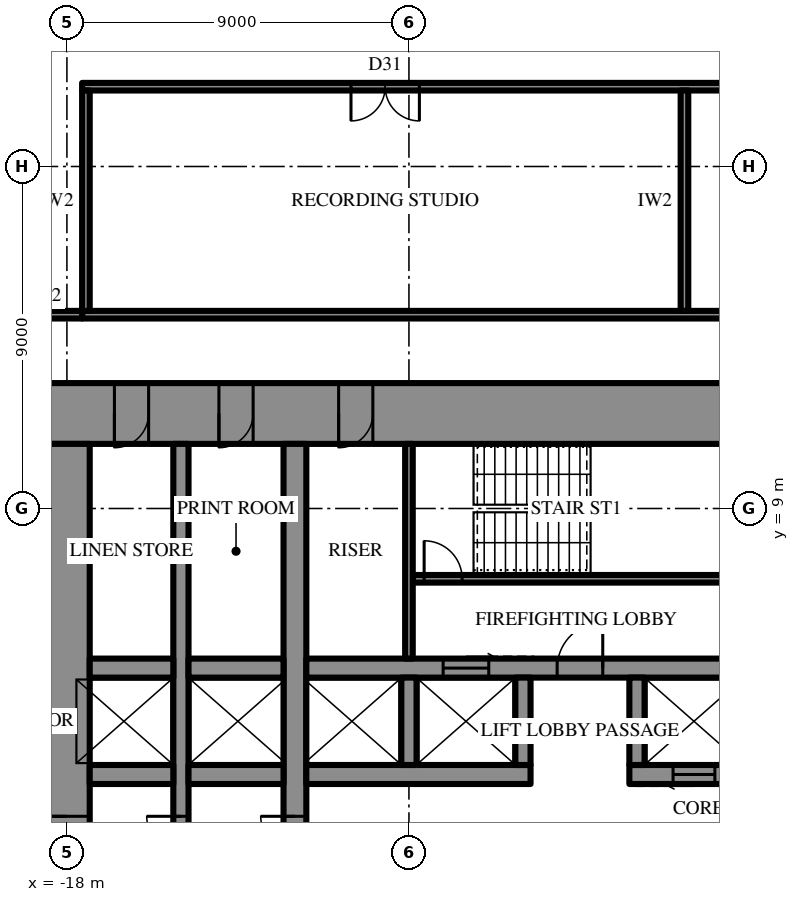
"""IFC4 building model, lengths in metres.
Left out: names, types, materials, properties, quantities, classifications, styles, units other than length and angle.
Written with IfcOpenShell. Run it as: python <this file> out.ifc"""

import sys

from ifc_helpers import new_model, si_unit, direction, frame, frame_2d, origin, place, context, subcontext, project, spatial, rectangle, extrude, element, fill, save


model = new_model("IFC4")
c1 = context("Model", 3, precision=1e-05, world=origin(), true_north=direction((0.0, 1.0)))
c2 = subcontext(c1, "Body", "Model", "MODEL_VIEW")
j1 = project(units=[si_unit("LENGTHUNIT", "METRE"), si_unit("PLANEANGLEUNIT", "RADIAN")], contexts=[c1])
p1 = place(None, origin())
s1 = spatial("IfcSite", under=j1, at=p1, CompositionType="ELEMENT")
p2 = place(p1, origin())
s2 = spatial("IfcBuilding", under=s1, at=p2, CompositionType="ELEMENT")
p3 = place(p2, frame((0.0, 0.0, 99.1)))
s3 = spatial("IfcBuildingStorey", under=s2, at=p3, CompositionType="ELEMENT", Elevation=99.1)
p4 = place(p3, frame((-18.6, 11.5, 0.0), z_axis=(0.0, 0.0, 1.0), x_axis=(1.0, 0.0, 0.0)))
e1 = element("IfcWall", 1, at=p4, inside=s3, PredefinedType="SHEAR", context=c2, shape_type="SweptSolid", body=[
    extrude(rectangle(XDim=37.2, YDim=1.6, at=frame_2d((18.6, 0.0))), origin(), (0.0, 0.0, 1.0), 4.2),
])
p5 = place(p4, frame((19.45, 0.0, 0.0)))
e2 = element("IfcOpeningElement", 2, at=p5, cuts=e1, PredefinedType="OPENING", context=c2, shape_type="SweptSolid", body=[
    extrude(rectangle(XDim=0.9, YDim=2.2, at=frame_2d((0.45, 1.1))), frame((0.0, 0.81, 0.0), z_axis=(0.0, -1.0, 0.0), x_axis=(1.0, 0.0, 0.0)), (0.0, 0.0, 1.0), 1.62),
])
p6 = place(p4, frame((22.45, 0.0, 0.0)))
e3 = element("IfcOpeningElement", 3, at=p6, cuts=e1, PredefinedType="OPENING", context=c2, shape_type="SweptSolid", body=[
    extrude(rectangle(XDim=0.9, YDim=2.2, at=frame_2d((0.45, 1.1))), frame((0.0, 0.81, 0.0), z_axis=(0.0, -1.0, 0.0), x_axis=(1.0, 0.0, 0.0)), (0.0, 0.0, 1.0), 1.62),
])
p7 = place(p4, frame((25.5, 0.0, 0.0)))
e4 = element("IfcOpeningElement", 4, at=p7, cuts=e1, PredefinedType="OPENING", context=c2, shape_type="SweptSolid", body=[
    extrude(rectangle(XDim=1.0, YDim=2.2, at=frame_2d((0.5, 1.1))), frame((0.0, 0.81, 0.0), z_axis=(0.0, -1.0, 0.0), x_axis=(1.0, 0.0, 0.0)), (0.0, 0.0, 1.0), 1.62),
])
p8 = place(p4, frame((1.85, 0.0, 0.0)))
e5 = element("IfcOpeningElement", 5, at=p8, cuts=e1, PredefinedType="OPENING", context=c2, shape_type="SweptSolid", body=[
    extrude(rectangle(XDim=0.9, YDim=2.2, at=frame_2d((0.45, 1.1))), frame((0.0, 0.81, 0.0), z_axis=(0.0, -1.0, 0.0), x_axis=(1.0, 0.0, 0.0)), (0.0, 0.0, 1.0), 1.62),
])
p9 = place(p4, frame((4.6, 0.0, 0.0)))
e6 = element("IfcOpeningElement", 6, at=p9, cuts=e1, PredefinedType="OPENING", context=c2, shape_type="SweptSolid", body=[
    extrude(rectangle(XDim=0.9, YDim=2.2, at=frame_2d((0.45, 1.1))), frame((0.0, 0.81, 0.0), z_axis=(0.0, -1.0, 0.0), x_axis=(1.0, 0.0, 0.0)), (0.0, 0.0, 1.0), 1.62),
])
p10 = place(p4, frame((7.75, 0.0, 0.0)))
e7 = element("IfcOpeningElement", 7, at=p10, cuts=e1, PredefinedType="OPENING", context=c2, shape_type="SweptSolid", body=[
    extrude(rectangle(XDim=0.9, YDim=2.2, at=frame_2d((0.45, 1.1))), frame((0.0, 0.81, 0.0), z_axis=(0.0, -1.0, 0.0), x_axis=(1.0, 0.0, 0.0)), (0.0, 0.0, 1.0), 1.62),
])
p11 = place(p4, frame((28.55, 0.0, 0.0)))
e8 = element("IfcOpeningElement", 8, at=p11, cuts=e1, PredefinedType="OPENING", context=c2, shape_type="SweptSolid", body=[
    extrude(rectangle(XDim=0.9, YDim=2.2, at=frame_2d((0.45, 1.1))), frame((0.0, 0.81, 0.0), z_axis=(0.0, -1.0, 0.0), x_axis=(1.0, 0.0, 0.0)), (0.0, 0.0, 1.0), 1.62),
])
p12 = place(p4, frame((31.7, 0.0, 0.0)))
e9 = element("IfcOpeningElement", 9, at=p12, cuts=e1, PredefinedType="OPENING", context=c2, shape_type="SweptSolid", body=[
    extrude(rectangle(XDim=0.9, YDim=2.2, at=frame_2d((0.45, 1.1))), frame((0.0, 0.81, 0.0), z_axis=(0.0, -1.0, 0.0), x_axis=(1.0, 0.0, 0.0)), (0.0, 0.0, 1.0), 1.62),
])
p13 = place(p4, frame((34.45, 0.0, 0.0)))
e10 = element("IfcOpeningElement", 10, at=p13, cuts=e1, PredefinedType="OPENING", context=c2, shape_type="SweptSolid", body=[
    extrude(rectangle(XDim=0.9, YDim=2.2, at=frame_2d((0.45, 1.1))), frame((0.0, 0.81, 0.0), z_axis=(0.0, -1.0, 0.0), x_axis=(1.0, 0.0, 0.0)), (0.0, 0.0, 1.0), 1.62),
])
p14 = place(p3, frame((-18.0, 10.7, 0.0), z_axis=(0.0, 0.0, 1.0), x_axis=(0.0, -1.0, 0.0)))
e11 = element("IfcWall", 11, at=p14, inside=s3, PredefinedType="SHEAR", context=c2, shape_type="SweptSolid", body=[
    extrude(rectangle(XDim=21.4, YDim=1.2, at=frame_2d((10.7, 0.0))), origin(), (0.0, 0.0, 1.0), 4.2),
])
p15 = place(p14, frame((9.8, 0.0, 0.0)))
e12 = element("IfcOpeningElement", 12, at=p15, cuts=e11, PredefinedType="OPENING", context=c2, shape_type="SweptSolid", body=[
    extrude(rectangle(XDim=1.8, YDim=2.4, at=frame_2d((0.9, 1.2))), frame((0.0, 0.61, 0.0), z_axis=(0.0, -1.0, 0.0), x_axis=(1.0, 0.0, 0.0)), (0.0, 0.0, 1.0), 1.22),
])
p16 = place(p3, frame((-12.0, -10.7, 0.0), z_axis=(0.0, 0.0, 1.0), x_axis=(0.0, 1.0, 0.0)))
e13 = element("IfcWall", 13, at=p16, inside=s3, PredefinedType="SHEAR", context=c2, shape_type="SweptSolid", body=[
    extrude(rectangle(XDim=21.4, YDim=0.6, at=frame_2d((10.7, 0.0))), origin(), (0.0, 0.0, 1.0), 4.2),
])
p17 = place(p16, frame((9.8, 0.0, 0.0)))
e14 = element("IfcOpeningElement", 14, at=p17, cuts=e13, PredefinedType="OPENING", context=c2, shape_type="SweptSolid", body=[
    extrude(rectangle(XDim=1.8, YDim=2.4, at=frame_2d((0.9, 1.2))), frame((0.0, 0.31, 0.0), z_axis=(0.0, -1.0, 0.0), x_axis=(1.0, 0.0, 0.0)), (0.0, 0.0, 1.0), 0.62),
])
p18 = place(p3, frame((-15.0, -10.7, 0.0), z_axis=(0.0, 0.0, 1.0), x_axis=(0.0, 1.0, 0.0)))
e15 = element("IfcWall", 15, at=p18, inside=s3, PredefinedType="SHEAR", context=c2, shape_type="SweptSolid", body=[
    extrude(rectangle(XDim=21.4, YDim=0.4, at=frame_2d((10.7, 0.0))), origin(), (0.0, 0.0, 1.0), 4.2),
])
p19 = place(p18, frame((9.8, 0.0, 0.0)))
e16 = element("IfcOpeningElement", 16, at=p19, cuts=e15, PredefinedType="OPENING", context=c2, shape_type="SweptSolid", body=[
    extrude(rectangle(XDim=1.8, YDim=2.4, at=frame_2d((0.9, 1.2))), frame((0.0, 0.21, 0.0), z_axis=(0.0, -1.0, 0.0), x_axis=(1.0, 0.0, 0.0)), (0.0, 0.0, 1.0), 0.42),
])
p20 = place(p3, frame((-17.4, 2.0, 0.0), z_axis=(0.0, 0.0, 1.0), x_axis=(1.0, 0.0, 0.0)))
e17 = element("IfcWall", 17, at=p20, inside=s3, PredefinedType="SHEAR", context=c2, shape_type="SweptSolid", body=[
    extrude(rectangle(XDim=2.2, YDim=0.5, at=frame_2d((1.1, 0.0))), origin(), (0.0, 0.0, 1.0), 4.2),
])
p21 = place(p3, frame((-14.8, 2.0, 0.0), z_axis=(0.0, 0.0, 1.0), x_axis=(1.0, 0.0, 0.0)))
e18 = element("IfcWall", 18, at=p21, inside=s3, PredefinedType="SHEAR", context=c2, shape_type="SweptSolid", body=[
    extrude(rectangle(XDim=2.5, YDim=0.5, at=frame_2d((1.25, 0.0))), origin(), (0.0, 0.0, 1.0), 4.2),
])
p22 = place(p3, frame((-11.7, 2.0, 0.0), z_axis=(0.0, 0.0, 1.0), x_axis=(1.0, 0.0, 0.0)))
e19 = element("IfcWall", 19, at=p22, inside=s3, PredefinedType="SHEAR", context=c2, shape_type="SweptSolid", body=[
    extrude(rectangle(XDim=5.9, YDim=0.5, at=frame_2d((2.95, 0.0))), origin(), (0.0, 0.0, 1.0), 4.2),
])
p23 = place(p3, frame((-3.2, 2.0, 0.0), z_axis=(0.0, 0.0, 1.0), x_axis=(1.0, 0.0, 0.0)))
e20 = element("IfcWall", 20, at=p23, inside=s3, PredefinedType="SHEAR", context=c2, shape_type="SweptSolid", body=[
    extrude(rectangle(XDim=14.9, YDim=0.5, at=frame_2d((7.45, 0.0))), origin(), (0.0, 0.0, 1.0), 4.2),
])
p24 = place(p23, frame((1.15, 0.0, 0.0)))
e21 = element("IfcOpeningElement", 21, at=p24, cuts=e20, PredefinedType="OPENING", context=c2, shape_type="SweptSolid", body=[
    extrude(rectangle(XDim=1.1, YDim=2.2, at=frame_2d((0.55, 1.1))), frame((0.0, 0.26, 0.0), z_axis=(0.0, -1.0, 0.0), x_axis=(1.0, 0.0, 0.0)), (0.0, 0.0, 1.0), 0.52),
])
p25 = place(p23, frame((4.15, 0.0, 0.0)))
e22 = element("IfcOpeningElement", 22, at=p25, cuts=e20, PredefinedType="OPENING", context=c2, shape_type="SweptSolid", body=[
    extrude(rectangle(XDim=1.1, YDim=2.2, at=frame_2d((0.55, 1.1))), frame((0.0, 0.26, 0.0), z_axis=(0.0, -1.0, 0.0), x_axis=(1.0, 0.0, 0.0)), (0.0, 0.0, 1.0), 0.52),
])
p26 = place(p23, frame((7.15, 0.0, 0.0)))
e23 = element("IfcOpeningElement", 23, at=p26, cuts=e20, PredefinedType="OPENING", context=c2, shape_type="SweptSolid", body=[
    extrude(rectangle(XDim=1.1, YDim=2.2, at=frame_2d((0.55, 1.1))), frame((0.0, 0.26, 0.0), z_axis=(0.0, -1.0, 0.0), x_axis=(1.0, 0.0, 0.0)), (0.0, 0.0, 1.0), 0.52),
])
p27 = place(p23, frame((10.15, 0.0, 0.0)))
e24 = element("IfcOpeningElement", 24, at=p27, cuts=e20, PredefinedType="OPENING", context=c2, shape_type="SweptSolid", body=[
    extrude(rectangle(XDim=1.1, YDim=2.2, at=frame_2d((0.55, 1.1))), frame((0.0, 0.26, 0.0), z_axis=(0.0, -1.0, 0.0), x_axis=(1.0, 0.0, 0.0)), (0.0, 0.0, 1.0), 0.52),
])
p28 = place(p3, frame((-17.4, 4.8, 0.0), z_axis=(0.0, 0.0, 1.0), x_axis=(1.0, 0.0, 0.0)))
e25 = element("IfcWall", 25, at=p28, inside=s3, PredefinedType="SHEAR", context=c2, shape_type="SweptSolid", body=[
    extrude(rectangle(XDim=2.2, YDim=0.5, at=frame_2d((1.1, 0.0))), origin(), (0.0, 0.0, 1.0), 4.2),
])
p29 = place(p3, frame((-14.8, 4.8, 0.0), z_axis=(0.0, 0.0, 1.0), x_axis=(1.0, 0.0, 0.0)))
e26 = element("IfcWall", 26, at=p29, inside=s3, PredefinedType="SHEAR", context=c2, shape_type="SweptSolid", body=[
    extrude(rectangle(XDim=2.5, YDim=0.5, at=frame_2d((1.25, 0.0))), origin(), (0.0, 0.0, 1.0), 4.2),
])
p30 = place(p3, frame((-11.7, 4.8, 0.0), z_axis=(0.0, 0.0, 1.0), x_axis=(1.0, 0.0, 0.0)))
e27 = element("IfcWall", 27, at=p30, inside=s3, PredefinedType="SHEAR", context=c2, shape_type="SweptSolid", body=[
    extrude(rectangle(XDim=23.4, YDim=0.5, at=frame_2d((11.7, 0.0))), origin(), (0.0, 0.0, 1.0), 4.2),
])
p31 = place(p30, frame((6.6, 0.0, 0.0)))
e28 = element("IfcOpeningElement", 28, at=p31, cuts=e27, PredefinedType="OPENING", context=c2, shape_type="SweptSolid", body=[
    extrude(rectangle(XDim=1.2, YDim=2.2, at=frame_2d((0.6, 1.1))), frame((0.0, 0.26, 0.0), z_axis=(0.0, -1.0, 0.0), x_axis=(1.0, 0.0, 0.0)), (0.0, 0.0, 1.0), 0.52),
])
p32 = place(p30, frame((3.6, 0.0, 0.0)))
e29 = element("IfcOpeningElement", 29, at=p32, cuts=e27, PredefinedType="OPENING", context=c2, shape_type="SweptSolid", body=[
    extrude(rectangle(XDim=1.2, YDim=2.2, at=frame_2d((0.6, 1.1))), frame((0.0, 0.26, 0.0), z_axis=(0.0, -1.0, 0.0), x_axis=(1.0, 0.0, 0.0)), (0.0, 0.0, 1.0), 0.52),
])
for number, where, z_axis, x_axis in (
    (30, (-9.0, 2.25, 0.0), (0.0, 0.0, 1.0), (0.0, 1.0, 0.0)),
    (31, (-6.0, 2.25, 0.0), (0.0, 0.0, 1.0), (0.0, 1.0, 0.0)),
    (32, (-3.0, 2.25, 0.0), (0.0, 0.0, 1.0), (0.0, 1.0, 0.0)),
):
    element("IfcWall", number, at=place(p3, frame(where, z_axis=z_axis, x_axis=x_axis)), inside=s3, PredefinedType="SHEAR", context=c2, shape_type="SweptSolid", body=[
        extrude(rectangle(XDim=2.3, YDim=0.4, at=frame_2d((1.15, 0.0))), origin(), (0.0, 0.0, 1.0), 4.2),
    ])
p33 = place(p3, frame((-8.9, 7.15, 0.0), z_axis=(0.0, 0.0, 1.0), x_axis=(1.0, 0.0, 0.0)))
e33 = element("IfcWall", 33, at=p33, inside=s3, PredefinedType="SHEAR", context=c2, shape_type="SweptSolid", body=[
    extrude(rectangle(XDim=8.6, YDim=0.2, at=frame_2d((4.3, 0.0))), origin(), (0.0, 0.0, 1.0), 4.2),
])
p34 = place(p33, frame((0.3, 0.0, 0.0)))
e34 = element("IfcOpeningElement", 34, at=p34, cuts=e33, PredefinedType="OPENING", context=c2, shape_type="SweptSolid", body=[
    extrude(rectangle(XDim=1.0, YDim=2.2, at=frame_2d((0.5, 1.1))), frame((0.0, 0.11, 0.0), z_axis=(0.0, -1.0, 0.0), x_axis=(1.0, 0.0, 0.0)), (0.0, 0.0, 1.0), 0.22),
])
p35 = place(p3, frame((-9.0, 5.05, 0.0), z_axis=(0.0, 0.0, 1.0), x_axis=(0.0, 1.0, 0.0)))
e35 = element("IfcWall", 35, at=p35, inside=s3, PredefinedType="PARTITIONING", context=c2, shape_type="SweptSolid", body=[
    extrude(rectangle(XDim=5.65, YDim=0.2, at=frame_2d((2.825, 0.0))), origin(), (0.0, 0.0, 1.0), 4.0),
])
p36 = place(p3, frame((-17.6, 14.1, 0.0), z_axis=(0.0, 0.0, 1.0), x_axis=(1.0, 0.0, 0.0)))
e36 = element("IfcWall", 36, at=p36, inside=s3, PredefinedType="PARTITIONING", context=c2, shape_type="SweptSolid", body=[
    extrude(rectangle(XDim=35.2, YDim=0.2, at=frame_2d((17.6, 0.0))), origin(), (0.0, 0.0, 1.0), 4.0),
])
p37 = place(p3, frame((-17.6, 20.1, 0.0), z_axis=(0.0, 0.0, 1.0), x_axis=(1.0, 0.0, 0.0)))
e37 = element("IfcWall", 37, at=p37, inside=s3, PredefinedType="PARTITIONING", context=c2, shape_type="SweptSolid", body=[
    extrude(rectangle(XDim=35.2, YDim=0.2, at=frame_2d((17.6, 0.0))), origin(), (0.0, 0.0, 1.0), 4.0),
])
p38 = place(p37, frame((7.075, 0.0, 0.0)))
e38 = element("IfcOpeningElement", 38, at=p38, cuts=e37, PredefinedType="OPENING", context=c2, shape_type="SweptSolid", body=[
    extrude(rectangle(XDim=1.8, YDim=2.4, at=frame_2d((0.9, 1.2))), frame((0.0, 0.11, 0.0), z_axis=(0.0, -1.0, 0.0), x_axis=(1.0, 0.0, 0.0)), (0.0, 0.0, 1.0), 0.22),
])
p39 = place(p37, frame((19.762, 0.0, 0.0)))
e39 = element("IfcOpeningElement", 39, at=p39, cuts=e37, PredefinedType="OPENING", context=c2, shape_type="SweptSolid", body=[
    extrude(rectangle(XDim=1.8, YDim=2.4, at=frame_2d((0.9, 1.2))), frame((0.0, 0.11, 0.0), z_axis=(0.0, -1.0, 0.0), x_axis=(1.0, 0.0, 0.0)), (0.0, 0.0, 1.0), 0.22),
])
p40 = place(p37, frame((29.387, 0.0, 0.0)))
e40 = element("IfcOpeningElement", 40, at=p40, cuts=e37, PredefinedType="OPENING", context=c2, shape_type="SweptSolid", body=[
    extrude(rectangle(XDim=1.8, YDim=2.4, at=frame_2d((0.9, 1.2))), frame((0.0, 0.11, 0.0), z_axis=(0.0, -1.0, 0.0), x_axis=(1.0, 0.0, 0.0)), (0.0, 0.0, 1.0), 0.22),
])
for number, where, z_axis, x_axis in (
    (41, (-17.5, 14.2, 0.0), (0.0, 0.0, 1.0), (0.0, 1.0, 0.0)),
    (42, (-1.75, 14.2, 0.0), (0.0, 0.0, 1.0), (0.0, 1.0, 0.0)),
):
    element("IfcWall", number, at=place(p3, frame(where, z_axis=z_axis, x_axis=x_axis)), inside=s3, PredefinedType="PARTITIONING", context=c2, shape_type="SweptSolid", body=[
        extrude(rectangle(XDim=5.8, YDim=0.2, at=frame_2d((2.9, 0.0))), origin(), (0.0, 0.0, 1.0), 4.0),
    ])
p41 = place(p3, frame((-19.6, 14.1, 0.0), z_axis=(0.0, 0.0, 1.0), x_axis=(1.0, 0.0, 0.0)))
e43 = element("IfcWall", 43, at=p41, inside=s3, PredefinedType="PARTITIONING", context=c2, shape_type="SweptSolid", body=[
    extrude(rectangle(XDim=2.0, YDim=0.2, at=frame_2d((1.0, 0.0))), origin(), (0.0, 0.0, 1.0), 4.0),
])
p42 = place(p15, frame((1.8, 0.0, 0.0), z_axis=(0.0, 0.0, 1.0), x_axis=(-1.0, 0.0, 0.0)))
e44 = element("IfcDoor", 44, at=p42, inside=s3, OperationType="DOUBLE_DOOR_SINGLE_SWING", PredefinedType="DOOR", context=c2, shape_type="SweptSolid", body=[
    extrude(rectangle(XDim=1.8, YDim=2.4, at=frame_2d((0.9, 1.2))), frame((0.0, 0.025, 0.0), z_axis=(0.0, -1.0, 0.0), x_axis=(1.0, 0.0, 0.0)), (0.0, 0.0, 1.0), 0.05),
])
fill(e12, e44)
p43 = place(p31, origin())
e45 = element("IfcDoor", 45, at=p43, inside=s3, OperationType="SINGLE_SWING_LEFT", PredefinedType="DOOR", context=c2, shape_type="SweptSolid", body=[
    extrude(rectangle(XDim=1.2, YDim=2.2, at=frame_2d((0.6, 1.1))), frame((0.0, 0.025, 0.0), z_axis=(0.0, -1.0, 0.0), x_axis=(1.0, 0.0, 0.0)), (0.0, 0.0, 1.0), 0.05),
])
fill(e28, e45)
p44 = place(p34, origin())
e46 = element("IfcDoor", 46, at=p44, inside=s3, OperationType="SINGLE_SWING_RIGHT", PredefinedType="DOOR", context=c2, shape_type="SweptSolid", body=[
    extrude(rectangle(XDim=1.0, YDim=2.2, at=frame_2d((0.5, 1.1))), frame((0.0, 0.025, 0.0), z_axis=(0.0, -1.0, 0.0), x_axis=(1.0, 0.0, 0.0)), (0.0, 0.0, 1.0), 0.05),
])
fill(e34, e46)
p45 = place(p8, frame((0.9, 0.0, 0.0), z_axis=(0.0, 0.0, 1.0), x_axis=(-1.0, 0.0, 0.0)))
e47 = element("IfcDoor", 47, at=p45, inside=s3, OperationType="SINGLE_SWING_LEFT", PredefinedType="DOOR", context=c2, shape_type="SweptSolid", body=[
    extrude(rectangle(XDim=0.9, YDim=2.2, at=frame_2d((0.45, 1.1))), frame((0.0, 0.025, 0.0), z_axis=(0.0, -1.0, 0.0), x_axis=(1.0, 0.0, 0.0)), (0.0, 0.0, 1.0), 0.05),
])
fill(e5, e47)
p46 = place(p9, frame((0.9, 0.0, 0.0), z_axis=(0.0, 0.0, 1.0), x_axis=(-1.0, 0.0, 0.0)))
e48 = element("IfcDoor", 48, at=p46, inside=s3, OperationType="SINGLE_SWING_LEFT", PredefinedType="DOOR", context=c2, shape_type="SweptSolid", body=[
    extrude(rectangle(XDim=0.9, YDim=2.2, at=frame_2d((0.45, 1.1))), frame((0.0, 0.025, 0.0), z_axis=(0.0, -1.0, 0.0), x_axis=(1.0, 0.0, 0.0)), (0.0, 0.0, 1.0), 0.05),
])
fill(e6, e48)
p47 = place(p10, frame((0.9, 0.0, 0.0), z_axis=(0.0, 0.0, 1.0), x_axis=(-1.0, 0.0, 0.0)))
e49 = element("IfcDoor", 49, at=p47, inside=s3, OperationType="SINGLE_SWING_LEFT", PredefinedType="DOOR", context=c2, shape_type="SweptSolid", body=[
    extrude(rectangle(XDim=0.9, YDim=2.2, at=frame_2d((0.45, 1.1))), frame((0.0, 0.025, 0.0), z_axis=(0.0, -1.0, 0.0), x_axis=(1.0, 0.0, 0.0)), (0.0, 0.0, 1.0), 0.05),
])
fill(e7, e49)
p48 = place(p17, origin())
e50 = element("IfcDoor", 50, at=p48, inside=s3, OperationType="DOUBLE_DOOR_SINGLE_SWING", PredefinedType="DOOR", context=c2, shape_type="SweptSolid", body=[
    extrude(rectangle(XDim=1.8, YDim=2.4, at=frame_2d((0.9, 1.2))), frame((0.0, 0.025, 0.0), z_axis=(0.0, -1.0, 0.0), x_axis=(1.0, 0.0, 0.0)), (0.0, 0.0, 1.0), 0.05),
])
fill(e14, e50)
p49 = place(p19, origin())
e51 = element("IfcDoor", 51, at=p49, inside=s3, OperationType="DOUBLE_DOOR_SINGLE_SWING", PredefinedType="DOOR", context=c2, shape_type="SweptSolid", body=[
    extrude(rectangle(XDim=1.8, YDim=2.4, at=frame_2d((0.9, 1.2))), frame((0.0, 0.025, 0.0), z_axis=(0.0, -1.0, 0.0), x_axis=(1.0, 0.0, 0.0)), (0.0, 0.0, 1.0), 0.05),
])
fill(e16, e51)
p50 = place(p32, origin())
e52 = element("IfcDoor", 52, at=p50, inside=s3, OperationType="SLIDING_TO_LEFT", PredefinedType="DOOR", context=c2, shape_type="SweptSolid", body=[
    extrude(rectangle(XDim=1.2, YDim=2.2, at=frame_2d((0.6, 1.1))), frame((0.0, 0.025, 0.0), z_axis=(0.0, -1.0, 0.0), x_axis=(1.0, 0.0, 0.0)), (0.0, 0.0, 1.0), 0.05),
])
fill(e29, e52)
p51 = place(p24, frame((1.1, 0.0, 0.0), z_axis=(0.0, 0.0, 1.0), x_axis=(-1.0, 0.0, 0.0)))
e53 = element("IfcDoor", 53, at=p51, inside=s3, OperationType="SLIDING_TO_LEFT", PredefinedType="DOOR", context=c2, shape_type="SweptSolid", body=[
    extrude(rectangle(XDim=1.1, YDim=2.2, at=frame_2d((0.55, 1.1))), frame((0.0, 0.025, 0.0), z_axis=(0.0, -1.0, 0.0), x_axis=(1.0, 0.0, 0.0)), (0.0, 0.0, 1.0), 0.05),
])
fill(e21, e53)
p52 = place(p38, frame((1.8, 0.0, 0.0), z_axis=(0.0, 0.0, 1.0), x_axis=(-1.0, 0.0, 0.0)))
e54 = element("IfcDoor", 54, at=p52, inside=s3, OperationType="DOUBLE_DOOR_SINGLE_SWING", PredefinedType="DOOR", context=c2, shape_type="SweptSolid", body=[
    extrude(rectangle(XDim=1.8, YDim=2.4, at=frame_2d((0.9, 1.2))), frame((0.0, 0.025, 0.0), z_axis=(0.0, -1.0, 0.0), x_axis=(1.0, 0.0, 0.0)), (0.0, 0.0, 1.0), 0.05),
])
fill(e38, e54)
save(model, sys.argv[1])
